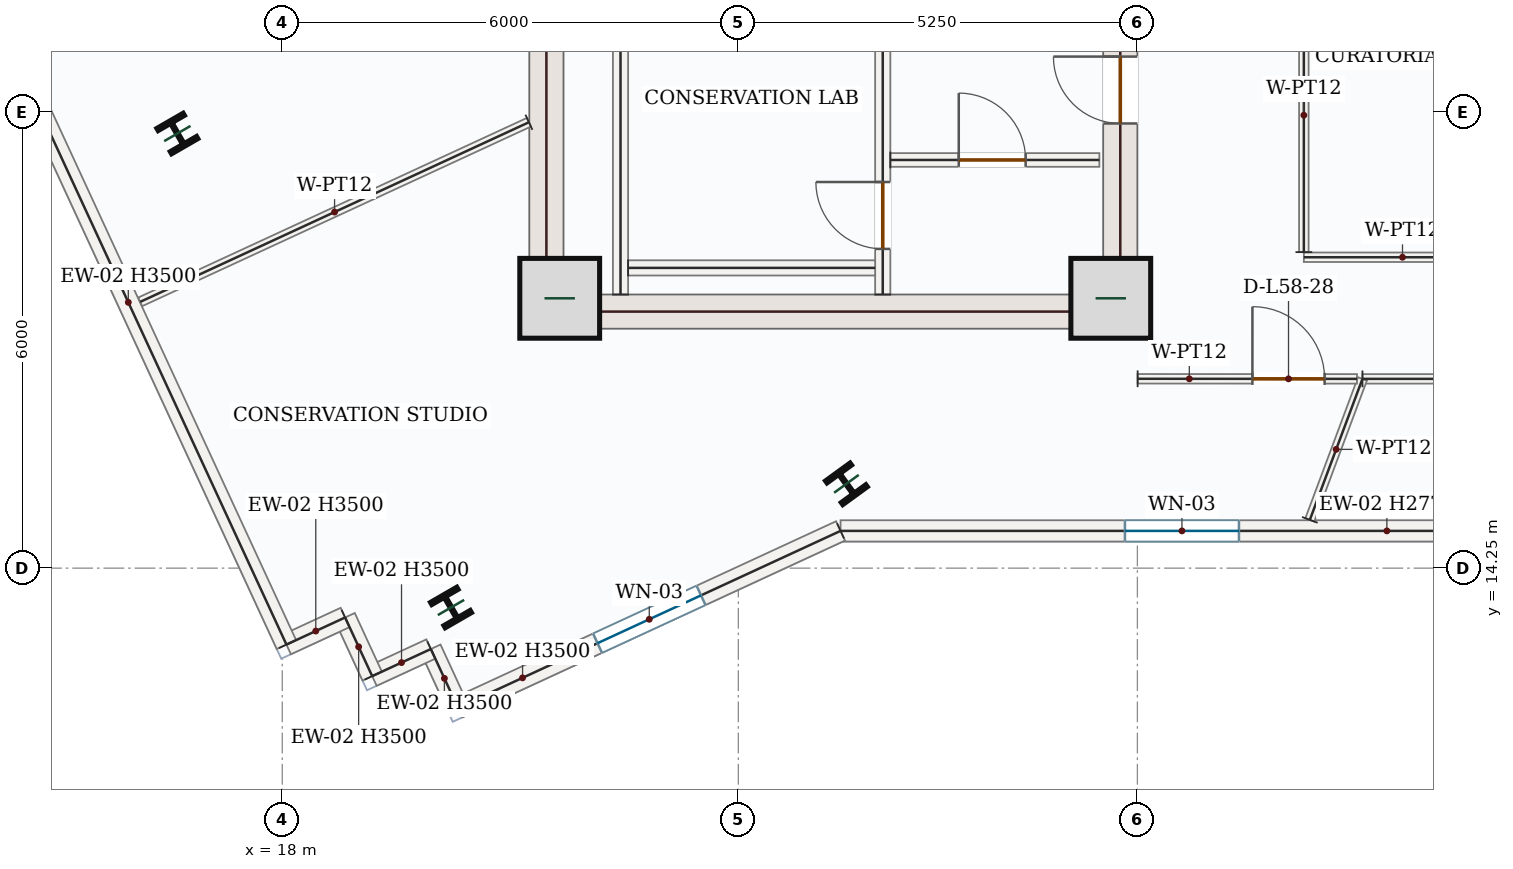
"""IFC4 building model, lengths in metres.
Left out: names, types, materials, properties, quantities, classifications, styles, units other than length and angle.
Written with IfcOpenShell. Run it as: python <this file> out.ifc"""

import sys

from ifc_helpers import new_model, si_unit, direction, frame, frame_2d, origin, origin_2d, place, context, subcontext, project, spatial, rectangle, i_section, extrude, source, transform, mapped, element, fill, save


model = new_model("IFC4")
c1 = context("Model", 3, precision=1e-05, world=origin(), true_north=direction((0.0, 1.0)))
c2 = subcontext(c1, "Body", "Model", "MODEL_VIEW")
j1 = project(units=[si_unit("LENGTHUNIT", "METRE"), si_unit("PLANEANGLEUNIT", "RADIAN")], contexts=[c1])
p1 = place(None, origin())
s1 = spatial("IfcSite", under=j1, at=p1, CompositionType="ELEMENT")
p2 = place(p1, origin())
s2 = spatial("IfcBuilding", under=s1, at=p2, CompositionType="ELEMENT")
p3 = place(p2, frame((0.0, 0.0, 246.6)))
s3 = spatial("IfcBuildingStorey", under=s2, at=p3, CompositionType="ELEMENT", Elevation=246.6)
m1 = source(origin(), c2, "Body", "SweptSolid", [
    extrude(rectangle(XDim=8.55, YDim=0.45, at=frame_2d((4.275, 0.0))), origin(), (0.0, 0.0, 1.0), 3.5),
])
p4 = place(p3, frame((21.475, 17.4, 0.0), z_axis=(0.0, 0.0, 1.0), x_axis=(0.0, 1.0, 0.0)))
e1 = element("IfcWall", 1, at=p4, inside=s3, PredefinedType="SHEAR", context=c2, shape_type="MappedRepresentation", body=[
    mapped(m1, transform((0.0, 0.0, 0.0), x_axis=(1.0, 0.0, 0.0), y_axis=(0.0, 1.0, 0.0), z_axis=(0.0, 0.0, 1.0), scale=1.0)),
])
p5 = place(p3, frame((29.025, 17.4, 0.0), z_axis=(0.0, 0.0, 1.0), x_axis=(0.0, 1.0, 0.0)))
e2 = element("IfcWall", 2, at=p5, inside=s3, PredefinedType="SHEAR", context=c2, shape_type="SweptSolid", body=[
    extrude(rectangle(XDim=8.55, YDim=0.45, at=frame_2d((4.275, 0.0))), origin(), (0.0, 0.0, 1.0), 3.5),
])
p6 = place(p5, frame((6.65, 0.0, 0.0)))
e3 = element("IfcOpeningElement", 3, at=p6, cuts=e2, PredefinedType="OPENING", context=c2, shape_type="SweptSolid", body=[
    extrude(rectangle(XDim=1.1, YDim=2.2, at=frame_2d((0.55, 1.1))), frame((0.0, 0.235, 0.0), z_axis=(0.0, -1.0, 0.0), x_axis=(1.0, 0.0, 0.0)), (0.0, 0.0, 1.0), 0.47),
])
p7 = place(p5, frame((2.7, 0.0, 0.0)))
e4 = element("IfcOpeningElement", 4, at=p7, cuts=e2, PredefinedType="OPENING", context=c2, shape_type="SweptSolid", body=[
    extrude(rectangle(XDim=0.88, YDim=2.1, at=frame_2d((0.44, 1.05))), frame((0.0, 0.235, 0.0), z_axis=(0.0, -1.0, 0.0), x_axis=(1.0, 0.0, 0.0)), (0.0, 0.0, 1.0), 0.47),
])
p8 = place(p5, frame((4.6, 0.0, 0.0)))
e5 = element("IfcOpeningElement", 5, at=p8, cuts=e2, PredefinedType="OPENING", context=c2, shape_type="SweptSolid", body=[
    extrude(rectangle(XDim=0.88, YDim=2.1, at=frame_2d((0.44, 1.05))), frame((0.0, 0.235, 0.0), z_axis=(0.0, -1.0, 0.0), x_axis=(1.0, 0.0, 0.0)), (0.0, 0.0, 1.0), 0.47),
])
m2 = source(origin(), c2, "Body", "SweptSolid", [
    extrude(rectangle(XDim=7.1, YDim=0.45, at=frame_2d((3.55, 0.0))), origin(), (0.0, 0.0, 1.0), 3.5),
])
p9 = place(p3, frame((21.7, 17.625, 0.0), z_axis=(0.0, 0.0, 1.0), x_axis=(1.0, 0.0, 0.0)))
e6 = element("IfcWall", 6, at=p9, inside=s3, PredefinedType="SHEAR", context=c2, shape_type="MappedRepresentation", body=[
    mapped(m2, transform((0.0, 0.0, 0.0), x_axis=(1.0, 0.0, 0.0), y_axis=(0.0, 1.0, 0.0), z_axis=(0.0, 0.0, 1.0), scale=1.0)),
])
m3 = source(origin(), c2, "Body", "SweptSolid", [
    extrude(rectangle(XDim=1.05, YDim=1.05, at=origin_2d()), origin(), (0.0, 0.0, 1.0), 3.75),
])
for number, where, z_axis, x_axis in (
    (7, (21.65, 17.8, 0.0), (0.0, 0.0, 1.0), (1.0, 0.0, 0.0)),
    (8, (28.9, 17.8, 0.0), (0.0, 0.0, 1.0), (1.0, 0.0, 0.0)),
):
    element("IfcColumn", number, at=place(p3, frame(where, z_axis=z_axis, x_axis=x_axis)), inside=s3, PredefinedType="COLUMN", context=c2, shape_type="MappedRepresentation", body=[
        mapped(m3, transform((0.0, 0.0, 0.0), x_axis=(1.0, 0.0, 0.0), y_axis=(0.0, 1.0, 0.0), z_axis=(0.0, 0.0, 1.0), scale=1.0)),
    ])
m4 = source(origin(), c2, "Body", "SweptSolid", [
    extrude(i_section(OverallWidth=0.399, OverallDepth=0.386, WebThickness=0.021, FlangeThickness=0.033, FilletRadius=0.018, at=origin_2d()), origin(), (0.0, 0.0, 1.0), 3.75),
])
for number, where, z_axis, x_axis in (
    (9, (25.422, 15.359, 0.0), (0.0, 0.0, 1.0), (0.809, 0.588, 0.0)),
    (10, (16.62, 19.968, 0.0), (0.0, 0.0, 1.0), (0.866, 0.5, 0.0)),
    (11, (20.22, 13.732, 0.0), (0.0, 0.0, 1.0), (0.866, 0.5, 0.0)),
):
    element("IfcColumn", number, at=place(p3, frame(where, z_axis=z_axis, x_axis=x_axis)), inside=s3, PredefinedType="COLUMN", context=c2, shape_type="MappedRepresentation", body=[
        mapped(m4, transform((0.0, 0.0, 0.0), x_axis=(1.0, 0.0, 0.0), y_axis=(0.0, 1.0, 0.0), z_axis=(0.0, 0.0, 1.0), scale=1.0)),
    ])
p10 = place(p3, frame((34.328, 14.74, 0.0), z_axis=(0.0, 0.0, 1.0), x_axis=(-1.0, 0.0, 0.0)))
e12 = element("IfcWall", 12, at=p10, inside=s3, PredefinedType="SOLIDWALL", context=c2, shape_type="SweptSolid", body=[
    extrude(rectangle(XDim=8.984, YDim=0.28, at=frame_2d((4.492, 0.0))), origin(), (0.0, 0.0, 1.0), 2.772),
])
p11 = place(p10, frame((3.742, 0.0, 0.85)))
e13 = element("IfcOpeningElement", 13, at=p11, cuts=e12, PredefinedType="OPENING", context=c2, shape_type="SweptSolid", body=[
    extrude(rectangle(XDim=1.5, YDim=1.5, at=frame_2d((0.75, 0.75))), frame((0.0, 0.15, 0.0), z_axis=(0.0, -1.0, 0.0), x_axis=(1.0, 0.0, 0.0)), (0.0, 0.0, 1.0), 0.3),
])
p12 = place(p3, frame((25.345, 14.74, 0.0), z_axis=(0.0, 0.0, 1.0), x_axis=(-0.907767275269, -0.419474163627, 0.0)))
e14 = element("IfcWall", 14, at=p12, inside=s3, PredefinedType="SOLIDWALL", context=c2, shape_type="SweptSolid", body=[
    extrude(rectangle(XDim=5.545, YDim=0.28, at=frame_2d((2.772, 0.0))), origin(), (0.0, 0.0, 1.0), 3.5),
])
p13 = place(p12, frame((2.022, 0.0, 0.85)))
e15 = element("IfcOpeningElement", 15, at=p13, cuts=e14, PredefinedType="OPENING", context=c2, shape_type="SweptSolid", body=[
    extrude(rectangle(XDim=1.5, YDim=1.5, at=frame_2d((0.75, 0.75))), frame((0.0, 0.15, 0.0), z_axis=(0.0, -1.0, 0.0), x_axis=(1.0, 0.0, 0.0)), (0.0, 0.0, 1.0), 0.3),
])
m5 = source(origin(), c2, "Body", "SweptSolid", [
    extrude(rectangle(XDim=0.85, YDim=0.28, at=frame_2d((0.425, 0.0))), origin(), (0.0, 0.0, 1.0), 3.5),
])
p14 = place(p3, frame((20.311, 12.414, 0.0), z_axis=(0.0, 0.0, 1.0), x_axis=(-0.419549800563, 0.907732320041, 0.0)))
e16 = element("IfcWall", 16, at=p14, inside=s3, PredefinedType="SOLIDWALL", context=c2, shape_type="MappedRepresentation", body=[
    mapped(m5, transform((0.0, 0.0, 0.0), x_axis=(1.0, 0.0, 0.0), y_axis=(0.0, 1.0, 0.0), z_axis=(0.0, 0.0, 1.0), scale=1.0)),
])
m6 = source(origin(), c2, "Body", "SweptSolid", [
    extrude(rectangle(XDim=0.85, YDim=0.28, at=frame_2d((0.425, 0.0))), origin(), (0.0, 0.0, 1.0), 3.5),
])
p15 = place(p3, frame((19.955, 13.186, 0.0), z_axis=(0.0, 0.0, 1.0), x_axis=(-0.907681752694, -0.41965919009, 0.0)))
e17 = element("IfcWall", 17, at=p15, inside=s3, PredefinedType="SOLIDWALL", context=c2, shape_type="MappedRepresentation", body=[
    mapped(m6, transform((0.0, 0.0, 0.0), x_axis=(1.0, 0.0, 0.0), y_axis=(0.0, 1.0, 0.0), z_axis=(0.0, 0.0, 1.0), scale=1.0)),
])
for number, where, z_axis, x_axis in (
    (18, (19.183, 12.829, 0.0), (0.0, 0.0, 1.0), (-0.419, 0.908, 0.0)),
    (19, (18.827, 13.601, 0.0), (0.0, 0.0, 1.0), (-0.908, -0.419, 0.0)),
):
    element("IfcWall", number, at=place(p3, frame(where, z_axis=z_axis, x_axis=x_axis)), inside=s3, PredefinedType="SOLIDWALL", context=c2, shape_type="MappedRepresentation", body=[
        mapped(m5, transform((0.0, 0.0, 0.0), x_axis=(1.0, 0.0, 0.0), y_axis=(0.0, 1.0, 0.0), z_axis=(0.0, 0.0, 1.0), scale=1.0)),
    ])
m7 = source(origin(), c2, "Body", "SweptSolid", [
    extrude(rectangle(XDim=9.92, YDim=0.28, at=frame_2d((4.96, 0.0))), origin(), (0.0, 0.0, 1.0), 3.5),
])
p16 = place(p3, frame((18.055, 13.244, 0.0), z_axis=(0.0, 0.0, 1.0), x_axis=(-0.41946703495, 0.907770569357, 0.0)))
e20 = element("IfcWall", 20, at=p16, inside=s3, PredefinedType="SOLIDWALL", context=c2, shape_type="MappedRepresentation", body=[
    mapped(m7, transform((0.0, 0.0, 0.0), x_axis=(1.0, 0.0, 0.0), y_axis=(0.0, 1.0, 0.0), z_axis=(0.0, 0.0, 1.0), scale=1.0)),
])
m8 = source(origin(), c2, "Body", "SweptSolid", [
    extrude(rectangle(XDim=7.87, YDim=0.2, at=frame_2d((3.935, 0.0))), origin(), (0.0, 0.0, 1.0), 3.5),
])
p17 = place(p3, frame((22.45, 17.85, 0.0), z_axis=(0.0, 0.0, 1.0), x_axis=(0.0, 1.0, 0.0)))
e21 = element("IfcWall", 21, at=p17, inside=s3, PredefinedType="SOLIDWALL", context=c2, shape_type="MappedRepresentation", body=[
    mapped(m8, transform((0.0, 0.0, 0.0), x_axis=(1.0, 0.0, 0.0), y_axis=(0.0, 1.0, 0.0), z_axis=(0.0, 0.0, 1.0), scale=1.0)),
])
p18 = place(p3, frame((25.9, 17.85, 0.0), z_axis=(0.0, 0.0, 1.0), x_axis=(0.0, 1.0, 0.0)))
e22 = element("IfcWall", 22, at=p18, inside=s3, PredefinedType="SOLIDWALL", context=c2, shape_type="SweptSolid", body=[
    extrude(rectangle(XDim=8.0, YDim=0.2, at=frame_2d((4.0, 0.0))), origin(), (0.0, 0.0, 1.0), 3.5),
])
p19 = place(p18, frame((6.2, 0.0, 0.0)))
e23 = element("IfcOpeningElement", 23, at=p19, cuts=e22, PredefinedType="OPENING", context=c2, shape_type="SweptSolid", body=[
    extrude(rectangle(XDim=1.0, YDim=2.15, at=frame_2d((0.5, 1.075))), frame((0.0, 0.11, 0.0), z_axis=(0.0, -1.0, 0.0), x_axis=(1.0, 0.0, 0.0)), (0.0, 0.0, 1.0), 0.22),
])
p20 = place(p18, frame((0.6, 0.0, 0.0)))
e24 = element("IfcOpeningElement", 24, at=p20, cuts=e22, PredefinedType="OPENING", context=c2, shape_type="SweptSolid", body=[
    extrude(rectangle(XDim=0.88, YDim=2.1, at=frame_2d((0.44, 1.05))), frame((0.0, 0.11, 0.0), z_axis=(0.0, -1.0, 0.0), x_axis=(1.0, 0.0, 0.0)), (0.0, 0.0, 1.0), 0.22),
])
m9 = source(origin(), c2, "Body", "SweptSolid", [
    extrude(rectangle(XDim=3.25, YDim=0.2, at=frame_2d((1.625, 0.0))), origin(), (0.0, 0.0, 1.0), 3.5),
])
p21 = place(p3, frame((22.55, 18.2, 0.0), z_axis=(0.0, 0.0, 1.0), x_axis=(1.0, 0.0, 0.0)))
e25 = element("IfcWall", 25, at=p21, inside=s3, PredefinedType="SOLIDWALL", context=c2, shape_type="MappedRepresentation", body=[
    mapped(m9, transform((0.0, 0.0, 0.0), x_axis=(1.0, 0.0, 0.0), y_axis=(0.0, 1.0, 0.0), z_axis=(0.0, 0.0, 1.0), scale=1.0)),
])
p22 = place(p3, frame((26.0, 19.62, 0.0), z_axis=(0.0, 0.0, 1.0), x_axis=(1.0, 0.0, 0.0)))
e26 = element("IfcWall", 26, at=p22, inside=s3, PredefinedType="PARTITIONING", context=c2, shape_type="SweptSolid", body=[
    extrude(rectangle(XDim=2.75, YDim=0.18, at=frame_2d((1.375, 0.0))), origin(), (0.0, 0.0, 1.0), 3.5),
])
p23 = place(p22, frame((0.9, 0.0, 0.0)))
e27 = element("IfcOpeningElement", 27, at=p23, cuts=e26, PredefinedType="OPENING", context=c2, shape_type="SweptSolid", body=[
    extrude(rectangle(XDim=0.88, YDim=2.1, at=frame_2d((0.44, 1.05))), frame((0.0, 0.1, 0.0), z_axis=(0.0, -1.0, 0.0), x_axis=(1.0, 0.0, 0.0)), (0.0, 0.0, 1.0), 0.2),
])
p24 = place(p3, frame((35.91, 18.34, 0.0), z_axis=(0.0, 0.0, 1.0), x_axis=(-1.0, 0.0, 0.0)))
e28 = element("IfcWall", 28, at=p24, inside=s3, PredefinedType="PARTITIONING", context=c2, shape_type="SweptSolid", body=[
    extrude(rectangle(XDim=4.47, YDim=0.125, at=frame_2d((2.235, 0.0))), origin(), (0.0, 0.0, 1.0), 3.5),
])
p25 = place(p24, frame((0.774, 0.0, 0.0)))
e29 = element("IfcOpeningElement", 29, at=p25, cuts=e28, PredefinedType="OPENING", context=c2, shape_type="SweptSolid", body=[
    extrude(rectangle(XDim=0.95, YDim=2.15, at=frame_2d((0.475, 1.075))), frame((0.0, 0.073, 0.0), z_axis=(0.0, -1.0, 0.0), x_axis=(1.0, 0.0, 0.0)), (0.0, 0.0, 1.0), 0.145),
])
m10 = source(origin(), c2, "Body", "SweptSolid", [
    extrude(rectangle(XDim=3.603, YDim=0.125, at=frame_2d((1.801, 0.0))), origin(), (0.0, 0.0, 1.0), 3.5),
])
p26 = place(p3, frame((31.44, 18.407, 0.0), z_axis=(0.0, 0.0, 1.0), x_axis=(0.0, 1.0, 0.0)))
e30 = element("IfcWall", 30, at=p26, inside=s3, PredefinedType="PARTITIONING", context=c2, shape_type="MappedRepresentation", body=[
    mapped(m10, transform((0.0, 0.0, 0.0), x_axis=(1.0, 0.0, 0.0), y_axis=(0.0, 1.0, 0.0), z_axis=(0.0, 0.0, 1.0), scale=1.0)),
])
p27 = place(p3, frame((32.211, 16.74, 0.0), z_axis=(0.0, 0.0, 1.0), x_axis=(1.0, 0.0, 0.0)))
e31 = element("IfcWall", 31, at=p27, inside=s3, PredefinedType="PARTITIONING", context=c2, shape_type="SweptSolid", body=[
    extrude(rectangle(XDim=5.236, YDim=0.125, at=frame_2d((2.618, 0.0))), origin(), (0.0, 0.0, 1.0), 3.5),
])
p28 = place(p27, frame((3.343, 0.0, 0.0)))
e32 = element("IfcOpeningElement", 32, at=p28, cuts=e31, PredefinedType="OPENING", context=c2, shape_type="SweptSolid", body=[
    extrude(rectangle(XDim=0.95, YDim=2.15, at=frame_2d((0.475, 1.075))), frame((0.0, 0.073, 0.0), z_axis=(0.0, -1.0, 0.0), x_axis=(1.0, 0.0, 0.0)), (0.0, 0.0, 1.0), 0.145),
])
m11 = source(origin(), c2, "Body", "SweptSolid", [
    extrude(rectangle(XDim=1.98, YDim=0.125, at=frame_2d((0.99, 0.0))), origin(), (0.0, 0.0, 1.0), 3.5),
])
p29 = place(p3, frame((31.519, 14.885, 0.0), z_axis=(0.0, 0.0, 1.0), x_axis=(0.349690675255, 0.9368652153, 0.0)))
e33 = element("IfcWall", 33, at=p29, inside=s3, PredefinedType="PARTITIONING", context=c2, shape_type="MappedRepresentation", body=[
    mapped(m11, transform((0.0, 0.0, 0.0), x_axis=(1.0, 0.0, 0.0), y_axis=(0.0, 1.0, 0.0), z_axis=(0.0, 0.0, 1.0), scale=1.0)),
])
m12 = source(origin(), c2, "Body", "SweptSolid", [
    extrude(rectangle(XDim=5.634, YDim=0.125, at=frame_2d((2.817, 0.0))), origin(), (0.0, 0.0, 1.0), 3.5),
])
p30 = place(p3, frame((21.245, 20.116, 0.0), z_axis=(0.0, 0.0, 1.0), x_axis=(-0.90777538002, -0.419456624014, 0.0)))
e34 = element("IfcWall", 34, at=p30, inside=s3, PredefinedType="PARTITIONING", context=c2, shape_type="MappedRepresentation", body=[
    mapped(m12, transform((0.0, 0.0, 0.0), x_axis=(1.0, 0.0, 0.0), y_axis=(0.0, 1.0, 0.0), z_axis=(0.0, 0.0, 1.0), scale=1.0)),
])
p31 = place(p3, frame((29.253, 16.741, 0.0), z_axis=(0.0, 0.0, 1.0), x_axis=(0.999999910531, -0.000423011806, 0.0)))
e35 = element("IfcWall", 35, at=p31, inside=s3, PredefinedType="PARTITIONING", context=c2, shape_type="SweptSolid", body=[
    extrude(rectangle(XDim=2.886, YDim=0.125, at=frame_2d((1.443, 0.0))), origin(), (0.0, 0.0, 1.0), 3.5),
])
p32 = place(p31, frame((1.51, 0.0, 0.0)))
e36 = element("IfcOpeningElement", 36, at=p32, cuts=e35, PredefinedType="OPENING", context=c2, shape_type="SweptSolid", body=[
    extrude(rectangle(XDim=0.95, YDim=2.15, at=frame_2d((0.475, 1.075))), frame((0.0, 0.073, 0.0), z_axis=(0.0, -1.0, 0.0), x_axis=(1.0, 0.0, 0.0)), (0.0, 0.0, 1.0), 0.145),
])
m13 = source(origin(), c2, "Body", "SweptSolid", [
    extrude(rectangle(XDim=1.5, YDim=1.5, at=frame_2d((0.75, 0.75))), frame((0.0, 0.03, 0.0), z_axis=(0.0, -1.0, 0.0), x_axis=(1.0, 0.0, 0.0)), (0.0, 0.0, 1.0), 0.06),
])
p33 = place(p11, origin())
e37 = element("IfcWindow", 37, at=p33, inside=s3, PartitioningType="SINGLE_PANEL", PredefinedType="WINDOW", context=c2, shape_type="MappedRepresentation", body=[
    mapped(m13, transform((0.0, 0.0, 0.0), x_axis=(1.0, 0.0, 0.0), y_axis=(0.0, 1.0, 0.0), z_axis=(0.0, 0.0, 1.0), scale=1.0)),
])
fill(e13, e37)
p34 = place(p13, origin())
e38 = element("IfcWindow", 38, at=p34, inside=s3, PartitioningType="SINGLE_PANEL", PredefinedType="WINDOW", context=c2, shape_type="MappedRepresentation", body=[
    mapped(m13, transform((0.0, 0.0, 0.0), x_axis=(1.0, 0.0, 0.0), y_axis=(0.0, 1.0, 0.0), z_axis=(0.0, 0.0, 1.0), scale=1.0)),
])
fill(e15, e38)
m14 = source(origin(), c2, "Body", "SweptSolid", [
    extrude(rectangle(XDim=0.88, YDim=2.1, at=frame_2d((0.44, 1.05))), frame((0.0, 0.025, 0.0), z_axis=(0.0, -1.0, 0.0), x_axis=(1.0, 0.0, 0.0)), (0.0, 0.0, 1.0), 0.05),
])
p35 = place(p20, origin())
e39 = element("IfcDoor", 39, at=p35, inside=s3, OperationType="SINGLE_SWING_RIGHT", PredefinedType="DOOR", context=c2, shape_type="MappedRepresentation", body=[
    mapped(m14, transform((0.0, 0.0, 0.0), x_axis=(1.0, 0.0, 0.0), y_axis=(0.0, 1.0, 0.0), z_axis=(0.0, 0.0, 1.0), scale=1.0)),
])
fill(e24, e39)
p36 = place(p23, origin())
e40 = element("IfcDoor", 40, at=p36, inside=s3, OperationType="SINGLE_SWING_LEFT", PredefinedType="DOOR", context=c2, shape_type="MappedRepresentation", body=[
    mapped(m14, transform((0.0, 0.0, 0.0), x_axis=(1.0, 0.0, 0.0), y_axis=(0.0, 1.0, 0.0), z_axis=(0.0, 0.0, 1.0), scale=1.0)),
])
fill(e27, e40)
p37 = place(p7, origin())
e41 = element("IfcDoor", 41, at=p37, inside=s3, OperationType="SINGLE_SWING_RIGHT", PredefinedType="DOOR", context=c2, shape_type="MappedRepresentation", body=[
    mapped(m14, transform((0.0, 0.0, 0.0), x_axis=(1.0, 0.0, 0.0), y_axis=(0.0, 1.0, 0.0), z_axis=(0.0, 0.0, 1.0), scale=1.0)),
])
fill(e4, e41)
m15 = source(origin(), c2, "Body", "SweptSolid", [
    extrude(rectangle(XDim=0.95, YDim=2.15, at=frame_2d((0.475, 1.075))), frame((0.0, 0.025, 0.0), z_axis=(0.0, -1.0, 0.0), x_axis=(1.0, 0.0, 0.0)), (0.0, 0.0, 1.0), 0.05),
])
p38 = place(p32, origin())
e42 = element("IfcDoor", 42, at=p38, inside=s3, OperationType="SINGLE_SWING_LEFT", PredefinedType="DOOR", context=c2, shape_type="MappedRepresentation", body=[
    mapped(m15, transform((0.0, 0.0, 0.0), x_axis=(1.0, 0.0, 0.0), y_axis=(0.0, 1.0, 0.0), z_axis=(0.0, 0.0, 1.0), scale=1.0)),
])
fill(e36, e42)
save(model, sys.argv[1])
